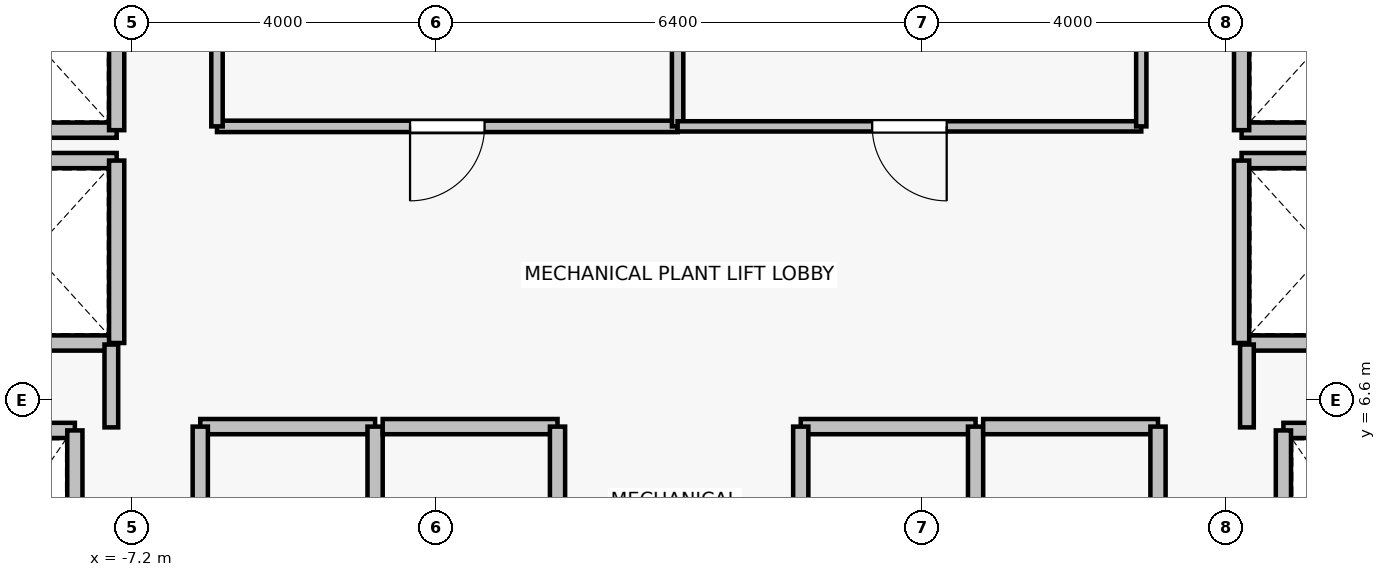
"""IFC4 building model, lengths in metres.
Left out: names, types, materials, properties, quantities, classifications, styles, units other than length and angle.
Written with IfcOpenShell. Run it as: python <this file> out.ifc"""

import sys

from ifc_helpers import new_model, si_unit, direction, frame, frame_2d, origin, place, context, subcontext, project, spatial, rectangle, extrude, source, transform, mapped, element, fill, save


model = new_model("IFC4")
c1 = context("Model", 3, precision=1e-05, world=origin(), true_north=direction((0.0, 1.0)))
c2 = subcontext(c1, "Body", "Model", "MODEL_VIEW")
j1 = project(units=[si_unit("LENGTHUNIT", "METRE"), si_unit("PLANEANGLEUNIT", "RADIAN")], contexts=[c1])
p1 = place(None, origin())
s1 = spatial("IfcSite", under=j1, at=p1, CompositionType="ELEMENT")
p2 = place(p1, origin())
s2 = spatial("IfcBuilding", under=s1, at=p2, CompositionType="ELEMENT")
p3 = place(p2, frame((0.0, 0.0, 199.0)))
s3 = spatial("IfcBuildingStorey", under=s2, at=p3, CompositionType="ELEMENT", Elevation=199.0)
p4 = place(p3, frame((-9.95, 6.2, 0.0), z_axis=(0.0, 0.0, 1.0), x_axis=(1.0, 0.0, 0.0)))
e1 = element("IfcWall", 1, at=p4, inside=s3, PredefinedType="SOLIDWALL", context=c2, shape_type="SweptSolid", body=[
    extrude(rectangle(XDim=2.0, YDim=0.2, at=frame_2d((1.0, 0.0))), origin(), (0.0, 0.0, 1.0), 6.35),
])
p5 = place(p3, frame((-7.95, 6.2, 0.0), z_axis=(0.0, 0.0, 1.0), x_axis=(0.0, -1.0, 0.0)))
e2 = element("IfcWall", 2, at=p5, inside=s3, PredefinedType="SOLIDWALL", context=c2, shape_type="SweptSolid", body=[
    extrude(rectangle(XDim=2.8, YDim=0.2, at=frame_2d((1.4, 0.0))), origin(), (0.0, 0.0, 1.0), 6.35),
])
p6 = place(p3, frame((7.95, 6.2, 0.0), z_axis=(0.0, 0.0, 1.0), x_axis=(1.0, 0.0, 0.0)))
e3 = element("IfcWall", 3, at=p6, inside=s3, PredefinedType="SOLIDWALL", context=c2, shape_type="SweptSolid", body=[
    extrude(rectangle(XDim=2.0, YDim=0.2, at=frame_2d((1.0, 0.0))), origin(), (0.0, 0.0, 1.0), 6.35),
])
p7 = place(p3, frame((7.95, 3.4, 0.0), z_axis=(0.0, 0.0, 1.0), x_axis=(0.0, 1.0, 0.0)))
e4 = element("IfcWall", 4, at=p7, inside=s3, PredefinedType="SOLIDWALL", context=c2, shape_type="SweptSolid", body=[
    extrude(rectangle(XDim=2.8, YDim=0.2, at=frame_2d((1.4, 0.0))), origin(), (0.0, 0.0, 1.0), 6.35),
])
p8 = place(p3, frame((-6.3, 6.25, 0.0), z_axis=(0.0, 0.0, 1.0), x_axis=(1.0, 0.0, 0.0)))
e5 = element("IfcWall", 5, at=p8, inside=s3, PredefinedType="SOLIDWALL", context=c2, shape_type="SweptSolid", body=[
    extrude(rectangle(XDim=2.3, YDim=0.2, at=frame_2d((1.15, 0.0))), origin(), (0.0, 0.0, 1.0), 6.35),
])
for number, where, z_axis, x_axis in (
    (6, (-6.3, 3.85, 0.0), (0.0, 0.0, 1.0), (0.0, 1.0, 0.0)),
    (7, (-4.0, 6.25, 0.0), (0.0, 0.0, 1.0), (0.0, -1.0, 0.0)),
):
    element("IfcWall", number, at=place(p3, frame(where, z_axis=z_axis, x_axis=x_axis)), inside=s3, PredefinedType="SOLIDWALL", context=c2, shape_type="SweptSolid", body=[
        extrude(rectangle(XDim=2.4, YDim=0.2, at=frame_2d((1.2, 0.0))), origin(), (0.0, 0.0, 1.0), 6.35),
    ])
p9 = place(p3, frame((-3.9, 6.25, 0.0), z_axis=(0.0, 0.0, 1.0), x_axis=(1.0, 0.0, 0.0)))
e8 = element("IfcWall", 8, at=p9, inside=s3, PredefinedType="SOLIDWALL", context=c2, shape_type="SweptSolid", body=[
    extrude(rectangle(XDim=2.3, YDim=0.2, at=frame_2d((1.15, 0.0))), origin(), (0.0, 0.0, 1.0), 6.35),
])
p10 = place(p3, frame((-1.6, 6.25, 0.0), z_axis=(0.0, 0.0, 1.0), x_axis=(0.0, -1.0, 0.0)))
e9 = element("IfcWall", 9, at=p10, inside=s3, PredefinedType="SOLIDWALL", context=c2, shape_type="SweptSolid", body=[
    extrude(rectangle(XDim=2.4, YDim=0.2, at=frame_2d((1.2, 0.0))), origin(), (0.0, 0.0, 1.0), 6.35),
])
p11 = place(p3, frame((1.6, 6.25, 0.0), z_axis=(0.0, 0.0, 1.0), x_axis=(1.0, 0.0, 0.0)))
e10 = element("IfcWall", 10, at=p11, inside=s3, PredefinedType="SOLIDWALL", context=c2, shape_type="SweptSolid", body=[
    extrude(rectangle(XDim=2.3, YDim=0.2, at=frame_2d((1.15, 0.0))), origin(), (0.0, 0.0, 1.0), 6.35),
])
for number, where, z_axis, x_axis in (
    (11, (1.6, 3.85, 0.0), (0.0, 0.0, 1.0), (0.0, 1.0, 0.0)),
    (12, (3.9, 6.25, 0.0), (0.0, 0.0, 1.0), (0.0, -1.0, 0.0)),
):
    element("IfcWall", number, at=place(p3, frame(where, z_axis=z_axis, x_axis=x_axis)), inside=s3, PredefinedType="SOLIDWALL", context=c2, shape_type="SweptSolid", body=[
        extrude(rectangle(XDim=2.4, YDim=0.2, at=frame_2d((1.2, 0.0))), origin(), (0.0, 0.0, 1.0), 6.35),
    ])
p12 = place(p3, frame((4.0, 6.25, 0.0), z_axis=(0.0, 0.0, 1.0), x_axis=(1.0, 0.0, 0.0)))
e13 = element("IfcWall", 13, at=p12, inside=s3, PredefinedType="SOLIDWALL", context=c2, shape_type="SweptSolid", body=[
    extrude(rectangle(XDim=2.3, YDim=0.2, at=frame_2d((1.15, 0.0))), origin(), (0.0, 0.0, 1.0), 6.35),
])
p13 = place(p3, frame((6.3, 6.25, 0.0), z_axis=(0.0, 0.0, 1.0), x_axis=(0.0, -1.0, 0.0)))
e14 = element("IfcWall", 14, at=p13, inside=s3, PredefinedType="SOLIDWALL", context=c2, shape_type="SweptSolid", body=[
    extrude(rectangle(XDim=2.4, YDim=0.2, at=frame_2d((1.2, 0.0))), origin(), (0.0, 0.0, 1.0), 6.35),
])
for number, where, z_axis, x_axis in (
    (15, (-7.4, 7.35, 0.0), (0.0, 0.0, 1.0), (-1.0, 0.0, 0.0)),
    (16, (-9.6, 9.75, 0.0), (0.0, 0.0, 1.0), (1.0, 0.0, 0.0)),
):
    element("IfcWall", number, at=place(p3, frame(where, z_axis=z_axis, x_axis=x_axis)), inside=s3, PredefinedType="SOLIDWALL", context=c2, shape_type="SweptSolid", body=[
        extrude(rectangle(XDim=2.2, YDim=0.2, at=frame_2d((1.1, 0.0))), origin(), (0.0, 0.0, 1.0), 5.89),
    ])
p14 = place(p3, frame((-7.4, 9.75, 0.0), z_axis=(0.0, 0.0, 1.0), x_axis=(0.0, -1.0, 0.0)))
e17 = element("IfcWall", 17, at=p14, inside=s3, PredefinedType="SOLIDWALL", context=c2, shape_type="SweptSolid", body=[
    extrude(rectangle(XDim=2.4, YDim=0.2, at=frame_2d((1.2, 0.0))), origin(), (0.0, 0.0, 1.0), 5.89),
])
p15 = place(p3, frame((-7.4, 10.15, 0.0), z_axis=(0.0, 0.0, 1.0), x_axis=(-1.0, 0.0, 0.0)))
e18 = element("IfcWall", 18, at=p15, inside=s3, PredefinedType="SOLIDWALL", context=c2, shape_type="SweptSolid", body=[
    extrude(rectangle(XDim=2.2, YDim=0.2, at=frame_2d((1.1, 0.0))), origin(), (0.0, 0.0, 1.0), 5.89),
])
p16 = place(p3, frame((-7.4, 12.55, 0.0), z_axis=(0.0, 0.0, 1.0), x_axis=(0.0, -1.0, 0.0)))
e19 = element("IfcWall", 19, at=p16, inside=s3, PredefinedType="SOLIDWALL", context=c2, shape_type="SweptSolid", body=[
    extrude(rectangle(XDim=2.4, YDim=0.2, at=frame_2d((1.2, 0.0))), origin(), (0.0, 0.0, 1.0), 5.89),
])
for number, where, z_axis, x_axis in (
    (20, (9.6, 7.35, 0.0), (0.0, 0.0, 1.0), (-1.0, 0.0, 0.0)),
    (21, (7.4, 9.75, 0.0), (0.0, 0.0, 1.0), (1.0, 0.0, 0.0)),
):
    element("IfcWall", number, at=place(p3, frame(where, z_axis=z_axis, x_axis=x_axis)), inside=s3, PredefinedType="SOLIDWALL", context=c2, shape_type="SweptSolid", body=[
        extrude(rectangle(XDim=2.2, YDim=0.2, at=frame_2d((1.1, 0.0))), origin(), (0.0, 0.0, 1.0), 5.89),
    ])
p17 = place(p3, frame((7.4, 7.35, 0.0), z_axis=(0.0, 0.0, 1.0), x_axis=(0.0, 1.0, 0.0)))
e22 = element("IfcWall", 22, at=p17, inside=s3, PredefinedType="SOLIDWALL", context=c2, shape_type="SweptSolid", body=[
    extrude(rectangle(XDim=2.4, YDim=0.2, at=frame_2d((1.2, 0.0))), origin(), (0.0, 0.0, 1.0), 5.89),
])
p18 = place(p3, frame((9.6, 10.15, 0.0), z_axis=(0.0, 0.0, 1.0), x_axis=(-1.0, 0.0, 0.0)))
e23 = element("IfcWall", 23, at=p18, inside=s3, PredefinedType="SOLIDWALL", context=c2, shape_type="SweptSolid", body=[
    extrude(rectangle(XDim=2.2, YDim=0.2, at=frame_2d((1.1, 0.0))), origin(), (0.0, 0.0, 1.0), 5.89),
])
p19 = place(p3, frame((7.4, 10.15, 0.0), z_axis=(0.0, 0.0, 1.0), x_axis=(0.0, 1.0, 0.0)))
e24 = element("IfcWall", 24, at=p19, inside=s3, PredefinedType="SOLIDWALL", context=c2, shape_type="SweptSolid", body=[
    extrude(rectangle(XDim=2.4, YDim=0.2, at=frame_2d((1.2, 0.0))), origin(), (0.0, 0.0, 1.0), 5.89),
])
for number, where, z_axis, x_axis in (
    (25, (-7.47, 7.33, 0.0), (0.0, 0.0, 1.0), (0.0, -1.0, 0.0)),
    (26, (7.47, 6.24, 0.0), (0.0, 0.0, 1.0), (0.0, 1.0, 0.0)),
):
    element("IfcWall", number, at=place(p3, frame(where, z_axis=z_axis, x_axis=x_axis)), inside=s3, PredefinedType="PARTITIONING", context=c2, shape_type="SweptSolid", body=[
        extrude(rectangle(XDim=1.09, YDim=0.18, at=frame_2d((0.545, 0.0))), origin(), (0.0, 0.0, 1.0), 5.89),
    ])
p20 = place(p3, frame((-0.02, 10.2, 0.0), z_axis=(0.0, 0.0, 1.0), x_axis=(-1.0, 0.0, 0.0)))
e27 = element("IfcWall", 27, at=p20, inside=s3, PredefinedType="PARTITIONING", context=c2, shape_type="SweptSolid", body=[
    extrude(rectangle(XDim=6.06, YDim=0.15, at=frame_2d((3.03, 0.0))), origin(), (0.0, 0.0, 1.0), 5.89),
])
p21 = place(p20, frame((2.54, 0.0, 0.0)))
e28 = element("IfcOpeningElement", 28, at=p21, cuts=e27, PredefinedType="OPENING", context=c2, shape_type="SweptSolid", body=[
    extrude(rectangle(XDim=0.98, YDim=2.15, at=frame_2d((0.49, 1.075))), frame((0.0, 0.085, 0.0), z_axis=(0.0, -1.0, 0.0), x_axis=(1.0, 0.0, 0.0)), (0.0, 0.0, 1.0), 0.17),
])
p22 = place(p3, frame((-6.08, 10.2, 0.0), z_axis=(0.0, 0.0, 1.0), x_axis=(0.0, 1.0, 0.0)))
e29 = element("IfcWall", 29, at=p22, inside=s3, PredefinedType="PARTITIONING", context=c2, shape_type="SweptSolid", body=[
    extrude(rectangle(XDim=2.8, YDim=0.15, at=frame_2d((1.4, 0.0))), origin(), (0.0, 0.0, 1.0), 6.35),
])
p23 = place(p3, frame((-0.02, 13.0, 0.0), z_axis=(0.0, 0.0, 1.0), x_axis=(0.0, -1.0, 0.0)))
e30 = element("IfcWall", 30, at=p23, inside=s3, PredefinedType="PARTITIONING", context=c2, shape_type="SweptSolid", body=[
    extrude(rectangle(XDim=2.8, YDim=0.15, at=frame_2d((1.4, 0.0))), origin(), (0.0, 0.0, 1.0), 5.89),
])
p24 = place(p3, frame((6.08, 10.2, 0.0), z_axis=(0.0, 0.0, 1.0), x_axis=(-1.0, 0.0, 0.0)))
e31 = element("IfcWall", 31, at=p24, inside=s3, PredefinedType="PARTITIONING", context=c2, shape_type="SweptSolid", body=[
    extrude(rectangle(XDim=6.1, YDim=0.135, at=frame_2d((3.05, 0.0))), origin(), (0.0, 0.0, 1.0), 5.89),
])
p25 = place(p24, frame((2.56, 0.0, 0.0)))
e32 = element("IfcOpeningElement", 32, at=p25, cuts=e31, PredefinedType="OPENING", context=c2, shape_type="SweptSolid", body=[
    extrude(rectangle(XDim=0.98, YDim=2.15, at=frame_2d((0.49, 1.075))), frame((0.0, 0.077, 0.0), z_axis=(0.0, -1.0, 0.0), x_axis=(1.0, 0.0, 0.0)), (0.0, 0.0, 1.0), 0.155),
])
p26 = place(p3, frame((6.08, 13.0, 0.0), z_axis=(0.0, 0.0, 1.0), x_axis=(0.0, -1.0, 0.0)))
e33 = element("IfcWall", 33, at=p26, inside=s3, PredefinedType="PARTITIONING", context=c2, shape_type="SweptSolid", body=[
    extrude(rectangle(XDim=2.8, YDim=0.135, at=frame_2d((1.4, 0.0))), origin(), (0.0, 0.0, 1.0), 6.35),
])
m1 = source(origin(), c2, "Body", "SweptSolid", [
    extrude(rectangle(XDim=0.98, YDim=2.15, at=frame_2d((0.49, 1.075))), frame((0.0, 0.025, 0.0), z_axis=(0.0, -1.0, 0.0), x_axis=(1.0, 0.0, 0.0)), (0.0, 0.0, 1.0), 0.05),
])
p27 = place(p21, origin())
e34 = element("IfcDoor", 34, at=p27, inside=s3, OperationType="SINGLE_SWING_RIGHT", PredefinedType="DOOR", context=c2, shape_type="MappedRepresentation", body=[
    mapped(m1, transform((0.0, 0.0, 0.0), x_axis=(1.0, 0.0, 0.0), y_axis=(0.0, 1.0, 0.0), z_axis=(0.0, 0.0, 1.0), scale=1.0)),
])
fill(e28, e34)
p28 = place(p25, origin())
e35 = element("IfcDoor", 35, at=p28, inside=s3, OperationType="SINGLE_SWING_LEFT", PredefinedType="DOOR", context=c2, shape_type="MappedRepresentation", body=[
    mapped(m1, transform((0.0, 0.0, 0.0), x_axis=(1.0, 0.0, 0.0), y_axis=(0.0, 1.0, 0.0), z_axis=(0.0, 0.0, 1.0), scale=1.0)),
])
fill(e32, e35)
save(model, sys.argv[1])
